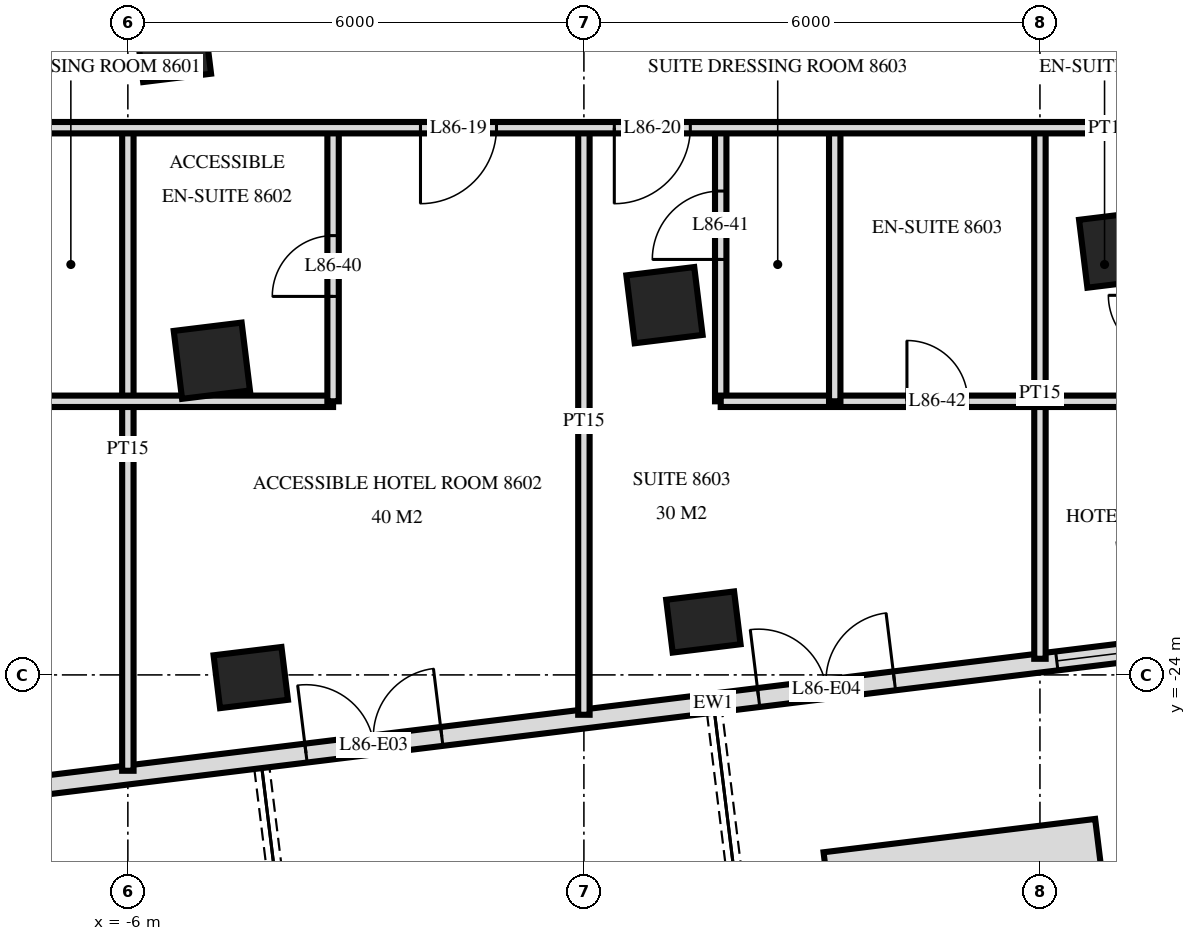
"""IFC4 building model, lengths in metres.
Left out: names, types, materials, properties, quantities, classifications, styles, units other than length and angle.
Written with IfcOpenShell. Run it as: python <this file> out.ifc"""

import sys

from ifc_helpers import new_model, si_unit, direction, frame, frame_2d, origin, origin_2d, place, context, subcontext, project, spatial, rectangle, extrude, element, fill, save


model = new_model("IFC4")
c1 = context("Model", 3, precision=1e-05, world=origin(), true_north=direction((0.0, 1.0)))
c2 = subcontext(c1, "Body", "Model", "MODEL_VIEW")
j1 = project(units=[si_unit("LENGTHUNIT", "METRE"), si_unit("PLANEANGLEUNIT", "RADIAN")], contexts=[c1])
p1 = place(None, origin())
s1 = spatial("IfcSite", under=j1, at=p1, CompositionType="ELEMENT")
p2 = place(p1, origin())
s2 = spatial("IfcBuilding", under=s1, at=p2, CompositionType="ELEMENT")
p3 = place(p2, frame((0.0, 0.0, 326.6)))
s3 = spatial("IfcBuildingStorey", under=s2, at=p3, CompositionType="ELEMENT", Elevation=326.6)
for number, where, z_axis, x_axis in (
    (1, (-5.407, -15.698, 0.0), (0.0, 0.0, 1.0), (0.993, 0.122, 0.0)),
    (2, (-4.895, -19.866, 0.0), (0.0, 0.0, 1.0), (0.993, 0.122, 0.0)),
):
    element("IfcColumn", number, at=place(p3, frame(where, z_axis=z_axis, x_axis=x_axis)), inside=s3, PredefinedType="COLUMN", context=c2, shape_type="SweptSolid", body=[
        extrude(rectangle(XDim=0.9, YDim=0.9, at=origin_2d()), origin(), (0.0, 0.0, 1.0), 4.0),
    ])
p4 = place(p3, frame((-4.383, -24.035, 0.0), z_axis=(0.0, 0.0, 1.0), x_axis=(0.992546151641, 0.121869343405, 0.0)))
e3 = element("IfcColumn", 3, at=p4, inside=s3, PredefinedType="COLUMN", context=c2, shape_type="SweptSolid", body=[
    extrude(rectangle(XDim=0.9, YDim=0.7, at=origin_2d()), origin(), (0.0, 0.0, 1.0), 4.0),
])
p5 = place(p3, frame((1.06, -19.135, 0.0), z_axis=(0.0, 0.0, 1.0), x_axis=(0.992546151641, 0.121869343405, 0.0)))
e4 = element("IfcColumn", 4, at=p5, inside=s3, PredefinedType="COLUMN", context=c2, shape_type="SweptSolid", body=[
    extrude(rectangle(XDim=0.9, YDim=0.9, at=origin_2d()), origin(), (0.0, 0.0, 1.0), 4.0),
])
p6 = place(p3, frame((1.572, -23.304, 0.0), z_axis=(0.0, 0.0, 1.0), x_axis=(0.992546151641, 0.121869343405, 0.0)))
e5 = element("IfcColumn", 5, at=p6, inside=s3, PredefinedType="COLUMN", context=c2, shape_type="SweptSolid", body=[
    extrude(rectangle(XDim=0.9, YDim=0.7, at=origin_2d()), origin(), (0.0, 0.0, 1.0), 4.0),
])
p7 = place(p3, frame((7.016, -18.404, 0.0), z_axis=(0.0, 0.0, 1.0), x_axis=(0.992546151641, 0.121869343405, 0.0)))
e6 = element("IfcColumn", 6, at=p7, inside=s3, PredefinedType="COLUMN", context=c2, shape_type="SweptSolid", body=[
    extrude(rectangle(XDim=0.9, YDim=0.9, at=origin_2d()), origin(), (0.0, 0.0, 1.0), 4.0),
])
p8 = place(p3, frame((-16.138, -26.561, 0.0), z_axis=(0.0, 0.0, 1.0), x_axis=(0.992546726876, 0.121864658405, 0.0)))
e7 = element("IfcWall", 7, at=p8, inside=s3, PredefinedType="SOLIDWALL", context=c2, shape_type="SweptSolid", body=[
    extrude(rectangle(XDim=35.951, YDim=0.25, at=frame_2d((17.975, 0.0))), origin(), (0.0, 0.0, 1.0), 3.72),
])
p9 = place(p8, frame((0.575, 0.0, 0.0)))
e8 = element("IfcOpeningElement", 8, at=p9, cuts=e7, PredefinedType="OPENING", context=c2, shape_type="SweptSolid", body=[
    extrude(rectangle(XDim=1.8, YDim=2.4, at=frame_2d((0.9, 1.2))), frame((0.0, 0.135, 0.0), z_axis=(0.0, -1.0, 0.0), x_axis=(1.0, 0.0, 0.0)), (0.0, 0.0, 1.0), 0.27),
])
p10 = place(p8, frame((6.576, 0.0, 0.0)))
e9 = element("IfcOpeningElement", 9, at=p10, cuts=e7, PredefinedType="OPENING", context=c2, shape_type="SweptSolid", body=[
    extrude(rectangle(XDim=1.8, YDim=2.4, at=frame_2d((0.9, 1.2))), frame((0.0, 0.135, 0.0), z_axis=(0.0, -1.0, 0.0), x_axis=(1.0, 0.0, 0.0)), (0.0, 0.0, 1.0), 0.27),
])
p11 = place(p8, frame((12.575, 0.0, 0.0)))
e10 = element("IfcOpeningElement", 10, at=p11, cuts=e7, PredefinedType="OPENING", context=c2, shape_type="SweptSolid", body=[
    extrude(rectangle(XDim=1.8, YDim=2.4, at=frame_2d((0.9, 1.2))), frame((0.0, 0.135, 0.0), z_axis=(0.0, -1.0, 0.0), x_axis=(1.0, 0.0, 0.0)), (0.0, 0.0, 1.0), 0.27),
])
p12 = place(p8, frame((18.575, 0.0, 0.0)))
e11 = element("IfcOpeningElement", 11, at=p12, cuts=e7, PredefinedType="OPENING", context=c2, shape_type="SweptSolid", body=[
    extrude(rectangle(XDim=1.8, YDim=2.4, at=frame_2d((0.9, 1.2))), frame((0.0, 0.135, 0.0), z_axis=(0.0, -1.0, 0.0), x_axis=(1.0, 0.0, 0.0)), (0.0, 0.0, 1.0), 0.27),
])
p13 = place(p8, frame((22.528, 0.0, 0.0)))
e12 = element("IfcOpeningElement", 12, at=p13, cuts=e7, PredefinedType="OPENING", context=c2, shape_type="SweptSolid", body=[
    extrude(rectangle(XDim=1.2, YDim=2.4, at=frame_2d((0.6, 1.2))), frame((0.0, 0.135, 0.0), z_axis=(0.0, -1.0, 0.0), x_axis=(1.0, 0.0, 0.0)), (0.0, 0.0, 1.0), 0.27),
])
p14 = place(p8, frame((25.923, 0.0, 0.0)))
e13 = element("IfcOpeningElement", 13, at=p14, cuts=e7, PredefinedType="OPENING", context=c2, shape_type="SweptSolid", body=[
    extrude(rectangle(XDim=1.8, YDim=2.4, at=frame_2d((0.9, 1.2))), frame((0.0, 0.135, 0.0), z_axis=(0.0, -1.0, 0.0), x_axis=(1.0, 0.0, 0.0)), (0.0, 0.0, 1.0), 0.27),
])
p15 = place(p8, frame((30.576, 0.0, 0.0)))
e14 = element("IfcOpeningElement", 14, at=p15, cuts=e7, PredefinedType="OPENING", context=c2, shape_type="SweptSolid", body=[
    extrude(rectangle(XDim=1.8, YDim=2.4, at=frame_2d((0.9, 1.2))), frame((0.0, 0.135, 0.0), z_axis=(0.0, -1.0, 0.0), x_axis=(1.0, 0.0, 0.0)), (0.0, 0.0, 1.0), 0.27),
])
p16 = place(p3, frame((6.763, -26.193, 0.0), z_axis=(0.0, 0.0, 1.0), x_axis=(-0.992546765488, -0.121864343918, 0.0)))
e15 = element("IfcWall", 15, at=p16, inside=s3, PredefinedType="USERDEFINED", context=c2, shape_type="SweptSolid", body=[
    extrude(rectangle(XDim=3.6, YDim=0.6, at=frame_2d((1.8, 0.0))), origin(), (0.0, 0.0, 1.0), 0.65),
])
p17 = place(p3, frame((6.0, -23.788, 0.0), z_axis=(0.0, 0.0, 1.0), x_axis=(0.0, 1.0, 0.0)))
e16 = element("IfcWall", 16, at=p17, inside=s3, PredefinedType="PARTITIONING", context=c2, shape_type="SweptSolid", body=[
    extrude(rectangle(XDim=6.988, YDim=0.15, at=frame_2d((3.494, 0.0))), origin(), (0.0, 0.0, 1.0), 3.72),
])
p18 = place(p3, frame((3.3, -20.4, 0.0), z_axis=(0.0, 0.0, 1.0), x_axis=(0.0, 1.0, 0.0)))
e17 = element("IfcWall", 17, at=p18, inside=s3, PredefinedType="PARTITIONING", context=c2, shape_type="SweptSolid", body=[
    extrude(rectangle(XDim=3.6, YDim=0.15, at=frame_2d((1.8, 0.0))), origin(), (0.0, 0.0, 1.0), 3.72),
])
p19 = place(p3, frame((1.8, -20.4, 0.0), z_axis=(0.0, 0.0, 1.0), x_axis=(0.0, 1.0, 0.0)))
e18 = element("IfcWall", 18, at=p19, inside=s3, PredefinedType="PARTITIONING", context=c2, shape_type="SweptSolid", body=[
    extrude(rectangle(XDim=3.6, YDim=0.15, at=frame_2d((1.8, 0.0))), origin(), (0.0, 0.0, 1.0), 3.72),
])
p20 = place(p19, frame((1.866, 0.0, 0.0)))
e19 = element("IfcOpeningElement", 19, at=p20, cuts=e18, PredefinedType="OPENING", context=c2, shape_type="SweptSolid", body=[
    extrude(rectangle(XDim=0.9, YDim=2.1, at=frame_2d((0.45, 1.05))), frame((0.0, 0.085, 0.0), z_axis=(0.0, -1.0, 0.0), x_axis=(1.0, 0.0, 0.0)), (0.0, 0.0, 1.0), 0.17),
])
p21 = place(p3, frame((0.0, -24.524, 0.0), z_axis=(0.0, 0.0, 1.0), x_axis=(0.0, 1.0, 0.0)))
e20 = element("IfcWall", 20, at=p21, inside=s3, PredefinedType="PARTITIONING", context=c2, shape_type="SweptSolid", body=[
    extrude(rectangle(XDim=7.724, YDim=0.15, at=frame_2d((3.862, 0.0))), origin(), (0.0, 0.0, 1.0), 3.72),
])
p22 = place(p3, frame((-3.3, -20.4, 0.0), z_axis=(0.0, 0.0, 1.0), x_axis=(0.0, 1.0, 0.0)))
e21 = element("IfcWall", 21, at=p22, inside=s3, PredefinedType="PARTITIONING", context=c2, shape_type="SweptSolid", body=[
    extrude(rectangle(XDim=3.6, YDim=0.15, at=frame_2d((1.8, 0.0))), origin(), (0.0, 0.0, 1.0), 3.72),
])
p23 = place(p22, frame((1.38, 0.0, 0.0)))
e22 = element("IfcOpeningElement", 22, at=p23, cuts=e21, PredefinedType="OPENING", context=c2, shape_type="SweptSolid", body=[
    extrude(rectangle(XDim=0.8, YDim=2.1, at=frame_2d((0.4, 1.05))), frame((0.0, 0.085, 0.0), z_axis=(0.0, -1.0, 0.0), x_axis=(1.0, 0.0, 0.0)), (0.0, 0.0, 1.0), 0.17),
])
p24 = place(p3, frame((-6.0, -25.261, 0.0), z_axis=(0.0, 0.0, 1.0), x_axis=(0.0, 1.0, 0.0)))
e23 = element("IfcWall", 23, at=p24, inside=s3, PredefinedType="PARTITIONING", context=c2, shape_type="SweptSolid", body=[
    extrude(rectangle(XDim=8.461, YDim=0.15, at=frame_2d((4.23, 0.0))), origin(), (0.0, 0.0, 1.0), 3.72),
])
p25 = place(p3, frame((-7.5, -20.4, 0.0), z_axis=(0.0, 0.0, 1.0), x_axis=(1.0, 0.0, 0.0)))
e24 = element("IfcWall", 24, at=p25, inside=s3, PredefinedType="PARTITIONING", context=c2, shape_type="SweptSolid", body=[
    extrude(rectangle(XDim=4.2, YDim=0.15, at=frame_2d((2.1, 0.0))), origin(), (0.0, 0.0, 1.0), 3.72),
])
p26 = place(p3, frame((1.8, -20.4, 0.0), z_axis=(0.0, 0.0, 1.0), x_axis=(1.0, 0.0, 0.0)))
e25 = element("IfcWall", 25, at=p26, inside=s3, PredefinedType="PARTITIONING", context=c2, shape_type="SweptSolid", body=[
    extrude(rectangle(XDim=5.9, YDim=0.15, at=frame_2d((2.95, 0.0))), origin(), (0.0, 0.0, 1.0), 3.72),
])
p27 = place(p26, frame((2.45, 0.0, 0.0)))
e26 = element("IfcOpeningElement", 26, at=p27, cuts=e25, PredefinedType="OPENING", context=c2, shape_type="SweptSolid", body=[
    extrude(rectangle(XDim=0.8, YDim=2.1, at=frame_2d((0.4, 1.05))), frame((0.0, 0.085, 0.0), z_axis=(0.0, -1.0, 0.0), x_axis=(1.0, 0.0, 0.0)), (0.0, 0.0, 1.0), 0.17),
])
p28 = place(p3, frame((-9.3, -16.8, 0.0), z_axis=(0.0, 0.0, 1.0), x_axis=(1.0, 0.0, 0.0)))
e27 = element("IfcWall", 27, at=p28, inside=s3, PredefinedType="PARTITIONING", context=c2, shape_type="SweptSolid", body=[
    extrude(rectangle(XDim=32.561, YDim=0.15, at=frame_2d((16.281, 0.0))), origin(), (0.0, 0.0, 1.0), 3.72),
])
p29 = place(p28, frame((0.4, 0.0, 0.0)))
e28 = element("IfcOpeningElement", 28, at=p29, cuts=e27, PredefinedType="OPENING", context=c2, shape_type="SweptSolid", body=[
    extrude(rectangle(XDim=1.0, YDim=2.1, at=frame_2d((0.5, 1.05))), frame((0.0, 0.085, 0.0), z_axis=(0.0, -1.0, 0.0), x_axis=(1.0, 0.0, 0.0)), (0.0, 0.0, 1.0), 0.17),
])
p30 = place(p28, frame((7.15, 0.0, 0.0)))
e29 = element("IfcOpeningElement", 29, at=p30, cuts=e27, PredefinedType="OPENING", context=c2, shape_type="SweptSolid", body=[
    extrude(rectangle(XDim=1.0, YDim=2.1, at=frame_2d((0.5, 1.05))), frame((0.0, 0.085, 0.0), z_axis=(0.0, -1.0, 0.0), x_axis=(1.0, 0.0, 0.0)), (0.0, 0.0, 1.0), 0.17),
])
p31 = place(p28, frame((9.7, 0.0, 0.0)))
e30 = element("IfcOpeningElement", 30, at=p31, cuts=e27, PredefinedType="OPENING", context=c2, shape_type="SweptSolid", body=[
    extrude(rectangle(XDim=1.0, YDim=2.1, at=frame_2d((0.5, 1.05))), frame((0.0, 0.085, 0.0), z_axis=(0.0, -1.0, 0.0), x_axis=(1.0, 0.0, 0.0)), (0.0, 0.0, 1.0), 0.17),
])
p32 = place(p28, frame((17.149, 0.0, 0.0)))
e31 = element("IfcOpeningElement", 31, at=p32, cuts=e27, PredefinedType="OPENING", context=c2, shape_type="SweptSolid", body=[
    extrude(rectangle(XDim=1.0, YDim=2.1, at=frame_2d((0.5, 1.05))), frame((0.0, 0.085, 0.0), z_axis=(0.0, -1.0, 0.0), x_axis=(1.0, 0.0, 0.0)), (0.0, 0.0, 1.0), 0.17),
])
p33 = place(p28, frame((18.45, 0.0, 0.0)))
e32 = element("IfcOpeningElement", 32, at=p33, cuts=e27, PredefinedType="OPENING", context=c2, shape_type="SweptSolid", body=[
    extrude(rectangle(XDim=1.0, YDim=2.1, at=frame_2d((0.5, 1.05))), frame((0.0, 0.085, 0.0), z_axis=(0.0, -1.0, 0.0), x_axis=(1.0, 0.0, 0.0)), (0.0, 0.0, 1.0), 0.17),
])
p34 = place(p28, frame((24.98, 0.0, 0.0)))
e33 = element("IfcOpeningElement", 33, at=p34, cuts=e27, PredefinedType="OPENING", context=c2, shape_type="SweptSolid", body=[
    extrude(rectangle(XDim=1.0, YDim=2.1, at=frame_2d((0.5, 1.05))), frame((0.0, 0.085, 0.0), z_axis=(0.0, -1.0, 0.0), x_axis=(1.0, 0.0, 0.0)), (0.0, 0.0, 1.0), 0.17),
])
p35 = place(p11, origin())
e34 = element("IfcDoor", 34, at=p35, inside=s3, OperationType="DOUBLE_DOOR_SINGLE_SWING", PredefinedType="DOOR", context=c2, shape_type="SweptSolid", body=[
    extrude(rectangle(XDim=1.8, YDim=2.4, at=frame_2d((0.9, 1.2))), frame((0.0, 0.025, 0.0), z_axis=(0.0, -1.0, 0.0), x_axis=(1.0, 0.0, 0.0)), (0.0, 0.0, 1.0), 0.05),
])
fill(e10, e34)
p36 = place(p12, origin())
e35 = element("IfcDoor", 35, at=p36, inside=s3, OperationType="DOUBLE_DOOR_SINGLE_SWING", PredefinedType="DOOR", context=c2, shape_type="SweptSolid", body=[
    extrude(rectangle(XDim=1.8, YDim=2.4, at=frame_2d((0.9, 1.2))), frame((0.0, 0.025, 0.0), z_axis=(0.0, -1.0, 0.0), x_axis=(1.0, 0.0, 0.0)), (0.0, 0.0, 1.0), 0.05),
])
fill(e11, e35)
p37 = place(p13, origin())
e36 = element("IfcWindow", 36, at=p37, inside=s3, PartitioningType="SINGLE_PANEL", PredefinedType="WINDOW", context=c2, shape_type="SweptSolid", body=[
    extrude(rectangle(XDim=1.2, YDim=2.4, at=frame_2d((0.6, 1.2))), frame((0.0, 0.03, 0.0), z_axis=(0.0, -1.0, 0.0), x_axis=(1.0, 0.0, 0.0)), (0.0, 0.0, 1.0), 0.06),
])
fill(e12, e36)
p38 = place(p30, frame((0.5, 0.0, 0.0), z_axis=(0.0, 0.0, 1.0), x_axis=(-1.0, 0.0, 0.0)))
e37 = element("IfcDoor", 37, at=p38, inside=s3, OperationType="SINGLE_SWING_LEFT", PredefinedType="DOOR", context=c2, shape_type="SweptSolid", body=[
    extrude(rectangle(XDim=1.0, YDim=2.1, at=frame_2d((0.0, 1.05))), frame((0.0, -0.025, 0.0), z_axis=(0.0, 1.0, 0.0), x_axis=(-1.0, 0.0, 0.0)), (0.0, 0.0, 1.0), 0.05),
])
fill(e29, e37)
p39 = place(p31, frame((0.5, 0.0, 0.0), z_axis=(0.0, 0.0, 1.0), x_axis=(-1.0, 0.0, 0.0)))
e38 = element("IfcDoor", 38, at=p39, inside=s3, OperationType="SINGLE_SWING_LEFT", PredefinedType="DOOR", context=c2, shape_type="SweptSolid", body=[
    extrude(rectangle(XDim=1.0, YDim=2.1, at=frame_2d((0.0, 1.05))), frame((0.0, -0.025, 0.0), z_axis=(0.0, 1.0, 0.0), x_axis=(-1.0, 0.0, 0.0)), (0.0, 0.0, 1.0), 0.05),
])
fill(e30, e38)
p40 = place(p23, origin())
e39 = element("IfcDoor", 39, at=p40, inside=s3, OperationType="SINGLE_SWING_RIGHT", PredefinedType="DOOR", context=c2, shape_type="SweptSolid", body=[
    extrude(rectangle(XDim=0.8, YDim=2.1, at=frame_2d((0.4, 1.05))), frame((0.0, 0.025, 0.0), z_axis=(0.0, -1.0, 0.0), x_axis=(1.0, 0.0, 0.0)), (0.0, 0.0, 1.0), 0.05),
])
fill(e22, e39)
p41 = place(p20, origin())
e40 = element("IfcDoor", 40, at=p41, inside=s3, OperationType="SINGLE_SWING_RIGHT", PredefinedType="DOOR", context=c2, shape_type="SweptSolid", body=[
    extrude(rectangle(XDim=0.9, YDim=2.1, at=frame_2d((0.45, 1.05))), frame((0.0, 0.025, 0.0), z_axis=(0.0, -1.0, 0.0), x_axis=(1.0, 0.0, 0.0)), (0.0, 0.0, 1.0), 0.05),
])
fill(e19, e40)
p42 = place(p27, origin())
e41 = element("IfcDoor", 41, at=p42, inside=s3, OperationType="SINGLE_SWING_RIGHT", PredefinedType="DOOR", context=c2, shape_type="SweptSolid", body=[
    extrude(rectangle(XDim=0.8, YDim=2.1, at=frame_2d((0.4, 1.05))), frame((0.0, 0.025, 0.0), z_axis=(0.0, -1.0, 0.0), x_axis=(1.0, 0.0, 0.0)), (0.0, 0.0, 1.0), 0.05),
])
fill(e26, e41)
save(model, sys.argv[1])
